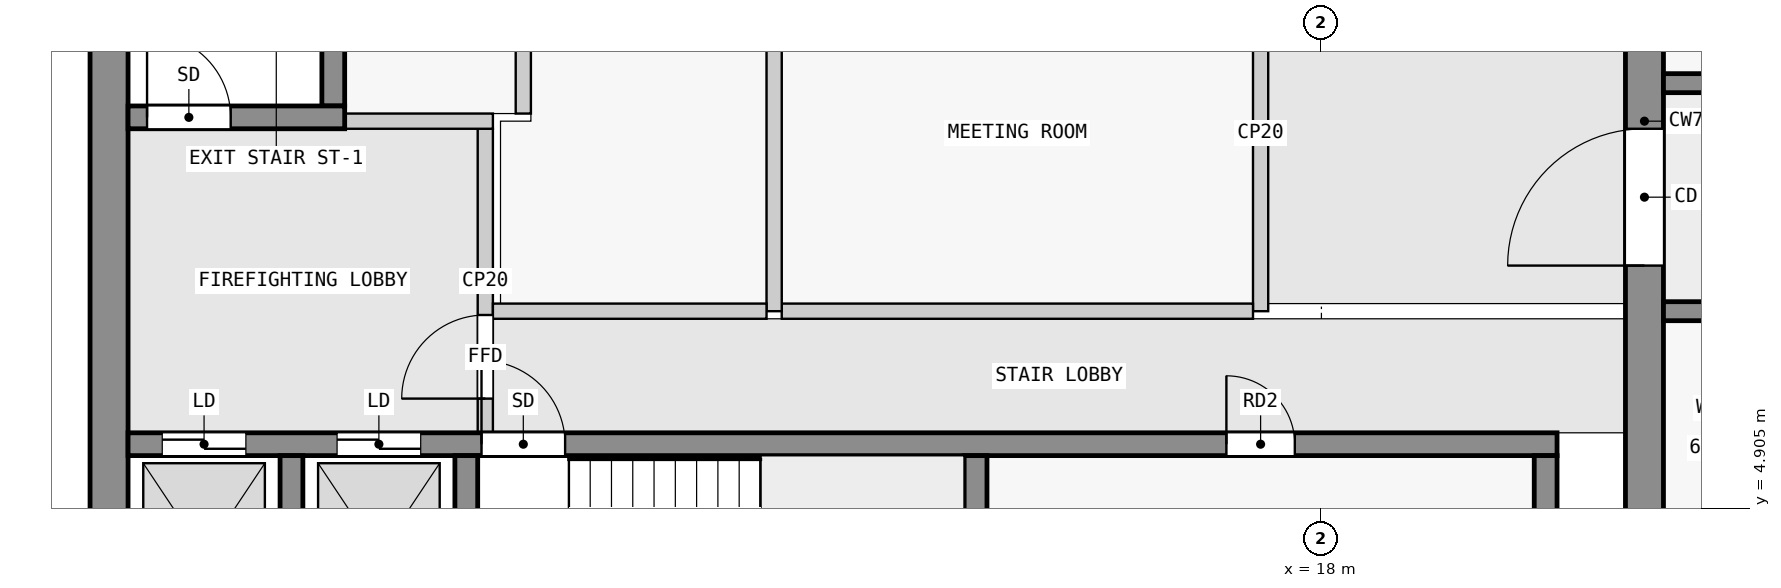
"""IFC4 building model, lengths in metres.
Left out: names, types, materials, properties, quantities, classifications, styles, units other than length and angle.
Written with IfcOpenShell. Run it as: python <this file> out.ifc"""

import sys

from ifc_helpers import new_model, si_unit, direction, frame, frame_2d, origin, place, context, subcontext, project, spatial, rectangle, extrude, element, fill, save


model = new_model("IFC4")
c1 = context("Model", 3, precision=1e-05, world=origin(), true_north=direction((0.0, 1.0)))
c2 = subcontext(c1, "Body", "Model", "MODEL_VIEW")
j1 = project(units=[si_unit("LENGTHUNIT", "METRE"), si_unit("PLANEANGLEUNIT", "RADIAN")], contexts=[c1])
p1 = place(None, origin())
s1 = spatial("IfcSite", under=j1, at=p1, CompositionType="ELEMENT")
p2 = place(p1, origin())
s2 = spatial("IfcBuilding", under=s1, at=p2, CompositionType="ELEMENT")
p3 = place(p2, frame((0.0, 0.0, 252.9)))
s3 = spatial("IfcBuildingStorey", under=s2, at=p3, CompositionType="ELEMENT", Elevation=252.9)
p4 = place(p3, frame((2.05, 2.5, 0.0), z_axis=(0.0, 0.0, 1.0), x_axis=(0.0, 1.0, 0.0)))
e1 = element("IfcWall", 1, at=p4, inside=s3, PredefinedType="SHEAR", context=c2, shape_type="SweptSolid", body=[
    extrude(rectangle(XDim=15.0, YDim=0.5, at=frame_2d((7.5, 0.0))), origin(), (0.0, 0.0, 1.0), 3.25),
])
p5 = place(p3, frame((22.25, 2.5, 0.0), z_axis=(0.0, 0.0, 1.0), x_axis=(0.0, 1.0, 0.0)))
e2 = element("IfcWall", 2, at=p5, inside=s3, PredefinedType="SHEAR", context=c2, shape_type="SweptSolid", body=[
    extrude(rectangle(XDim=15.0, YDim=0.5, at=frame_2d((7.5, 0.0))), origin(), (0.0, 0.0, 1.0), 3.25),
])
p6 = place(p5, frame((5.6, 0.0, 0.0)))
e3 = element("IfcOpeningElement", 3, at=p6, cuts=e2, PredefinedType="OPENING", context=c2, shape_type="SweptSolid", body=[
    extrude(rectangle(XDim=1.8, YDim=2.1, at=frame_2d((0.9, 1.05))), frame((0.0, 0.26, 0.0), z_axis=(0.0, -1.0, 0.0), x_axis=(1.0, 0.0, 0.0)), (0.0, 0.0, 1.0), 0.52),
])
for number, where, z_axis, x_axis in (
    (4, (4.45, 2.8, 0.0), (0.0, 0.0, 1.0), (0.0, 1.0, 0.0)),
    (5, (6.75, 2.8, 0.0), (0.0, 0.0, 1.0), (0.0, 1.0, 0.0)),
    (6, (13.45, 2.8, 0.0), (0.0, 0.0, 1.0), (0.0, 1.0, 0.0)),
    (7, (20.95, 2.8, 0.0), (0.0, 0.0, 1.0), (0.0, 1.0, 0.0)),
):
    element("IfcWall", number, at=place(p3, frame(where, z_axis=z_axis, x_axis=x_axis)), inside=s3, PredefinedType="SHEAR", context=c2, shape_type="SweptSolid", body=[
        extrude(rectangle(XDim=2.8, YDim=0.3, at=frame_2d((1.4, 0.0))), origin(), (0.0, 0.0, 1.0), 3.25),
    ])
p7 = place(p3, frame((2.3, 5.75, 0.0), z_axis=(0.0, 0.0, 1.0), x_axis=(1.0, 0.0, 0.0)))
e8 = element("IfcWall", 8, at=p7, inside=s3, PredefinedType="SHEAR", context=c2, shape_type="SweptSolid", body=[
    extrude(rectangle(XDim=18.8, YDim=0.3, at=frame_2d((9.4, 0.0))), origin(), (0.0, 0.0, 1.0), 3.25),
])
p8 = place(p7, frame((4.65, 0.0, 0.0)))
e9 = element("IfcOpeningElement", 9, at=p8, cuts=e8, PredefinedType="OPENING", context=c2, shape_type="SweptSolid", body=[
    extrude(rectangle(XDim=1.1, YDim=2.1, at=frame_2d((0.55, 1.05))), frame((0.0, 0.16, 0.0), z_axis=(0.0, -1.0, 0.0), x_axis=(1.0, 0.0, 0.0)), (0.0, 0.0, 1.0), 0.32),
])
p9 = place(p7, frame((0.45, 0.0, 0.0)))
e10 = element("IfcOpeningElement", 10, at=p9, cuts=e8, PredefinedType="OPENING", context=c2, shape_type="SweptSolid", body=[
    extrude(rectangle(XDim=1.1, YDim=2.1, at=frame_2d((0.55, 1.05))), frame((0.0, 0.16, 0.0), z_axis=(0.0, -1.0, 0.0), x_axis=(1.0, 0.0, 0.0)), (0.0, 0.0, 1.0), 0.32),
])
p10 = place(p7, frame((2.75, 0.0, 0.0)))
e11 = element("IfcOpeningElement", 11, at=p10, cuts=e8, PredefinedType="OPENING", context=c2, shape_type="SweptSolid", body=[
    extrude(rectangle(XDim=1.1, YDim=2.1, at=frame_2d((0.55, 1.05))), frame((0.0, 0.16, 0.0), z_axis=(0.0, -1.0, 0.0), x_axis=(1.0, 0.0, 0.0)), (0.0, 0.0, 1.0), 0.32),
])
p11 = place(p7, frame((14.45, 0.0, 0.0)))
e12 = element("IfcOpeningElement", 12, at=p11, cuts=e8, PredefinedType="OPENING", context=c2, shape_type="SweptSolid", body=[
    extrude(rectangle(XDim=0.9, YDim=2.1, at=frame_2d((0.45, 1.05))), frame((0.0, 0.16, 0.0), z_axis=(0.0, -1.0, 0.0), x_axis=(1.0, 0.0, 0.0)), (0.0, 0.0, 1.0), 0.32),
])
p12 = place(p3, frame((2.3, 10.05, 0.0), z_axis=(0.0, 0.0, 1.0), x_axis=(1.0, 0.0, 0.0)))
e13 = element("IfcWall", 13, at=p12, inside=s3, PredefinedType="SHEAR", context=c2, shape_type="SweptSolid", body=[
    extrude(rectangle(XDim=2.85, YDim=0.3, at=frame_2d((1.425, 0.0))), origin(), (0.0, 0.0, 1.0), 3.25),
])
p13 = place(p12, frame((0.25, 0.0, 0.0)))
e14 = element("IfcOpeningElement", 14, at=p13, cuts=e13, PredefinedType="OPENING", context=c2, shape_type="SweptSolid", body=[
    extrude(rectangle(XDim=1.1, YDim=2.1, at=frame_2d((0.55, 1.05))), frame((0.0, 0.16, 0.0), z_axis=(0.0, -1.0, 0.0), x_axis=(1.0, 0.0, 0.0)), (0.0, 0.0, 1.0), 0.32),
])
p14 = place(p3, frame((5.0, 10.2, 0.0), z_axis=(0.0, 0.0, 1.0), x_axis=(0.0, 1.0, 0.0)))
e15 = element("IfcWall", 15, at=p14, inside=s3, PredefinedType="SHEAR", context=c2, shape_type="SweptSolid", body=[
    extrude(rectangle(XDim=6.4, YDim=0.3, at=frame_2d((3.2, 0.0))), origin(), (0.0, 0.0, 1.0), 3.25),
])
p15 = place(p3, frame((22.5, 7.5, 0.0), z_axis=(0.0, 0.0, 1.0), x_axis=(1.0, 0.0, 0.0)))
e16 = element("IfcWall", 16, at=p15, inside=s3, PredefinedType="SHEAR", context=c2, shape_type="SweptSolid", body=[
    extrude(rectangle(XDim=22.5, YDim=0.25, at=frame_2d((11.25, 0.0))), origin(), (0.0, 0.0, 1.0), 3.25),
])
p16 = place(p15, frame((1.75, 0.0, 0.0)))
e17 = element("IfcOpeningElement", 17, at=p16, cuts=e16, PredefinedType="OPENING", context=c2, shape_type="SweptSolid", body=[
    extrude(rectangle(XDim=1.0, YDim=2.1, at=frame_2d((0.5, 1.05))), frame((0.0, 0.135, 0.0), z_axis=(0.0, -1.0, 0.0), x_axis=(1.0, 0.0, 0.0)), (0.0, 0.0, 1.0), 0.27),
])
p17 = place(p15, frame((5.85, 0.0, 0.0)))
e18 = element("IfcOpeningElement", 18, at=p17, cuts=e16, PredefinedType="OPENING", context=c2, shape_type="SweptSolid", body=[
    extrude(rectangle(XDim=1.8, YDim=2.1, at=frame_2d((0.9, 1.05))), frame((0.0, 0.135, 0.0), z_axis=(0.0, -1.0, 0.0), x_axis=(1.0, 0.0, 0.0)), (0.0, 0.0, 1.0), 0.27),
])
p18 = place(p15, frame((10.75, 0.0, 0.0)))
e19 = element("IfcOpeningElement", 19, at=p18, cuts=e16, PredefinedType="OPENING", context=c2, shape_type="SweptSolid", body=[
    extrude(rectangle(XDim=1.0, YDim=2.1, at=frame_2d((0.5, 1.05))), frame((0.0, 0.135, 0.0), z_axis=(0.0, -1.0, 0.0), x_axis=(1.0, 0.0, 0.0)), (0.0, 0.0, 1.0), 0.27),
])
p19 = place(p15, frame((15.25, 0.0, 0.0)))
e20 = element("IfcOpeningElement", 20, at=p19, cuts=e16, PredefinedType="OPENING", context=c2, shape_type="SweptSolid", body=[
    extrude(rectangle(XDim=1.0, YDim=2.1, at=frame_2d((0.5, 1.05))), frame((0.0, 0.135, 0.0), z_axis=(0.0, -1.0, 0.0), x_axis=(1.0, 0.0, 0.0)), (0.0, 0.0, 1.0), 0.27),
])
p20 = place(p15, frame((18.75, 0.0, 0.0)))
e21 = element("IfcOpeningElement", 21, at=p20, cuts=e16, PredefinedType="OPENING", context=c2, shape_type="SweptSolid", body=[
    extrude(rectangle(XDim=0.9, YDim=2.1, at=frame_2d((0.45, 1.05))), frame((0.0, 0.135, 0.0), z_axis=(0.0, -1.0, 0.0), x_axis=(1.0, 0.0, 0.0)), (0.0, 0.0, 1.0), 0.27),
])
p21 = place(p15, frame((20.95, 0.0, 0.0)))
e22 = element("IfcOpeningElement", 22, at=p21, cuts=e16, PredefinedType="OPENING", context=c2, shape_type="SweptSolid", body=[
    extrude(rectangle(XDim=1.0, YDim=2.1, at=frame_2d((0.5, 1.05))), frame((0.0, 0.135, 0.0), z_axis=(0.0, -1.0, 0.0), x_axis=(1.0, 0.0, 0.0)), (0.0, 0.0, 1.0), 0.27),
])
p22 = place(p3, frame((22.5, 10.5, 0.0), z_axis=(0.0, 0.0, 1.0), x_axis=(1.0, 0.0, 0.0)))
e23 = element("IfcWall", 23, at=p22, inside=s3, PredefinedType="SHEAR", context=c2, shape_type="SweptSolid", body=[
    extrude(rectangle(XDim=22.5, YDim=0.25, at=frame_2d((11.25, 0.0))), origin(), (0.0, 0.0, 1.0), 3.25),
])
p23 = place(p22, frame((1.75, 0.0, 0.0)))
e24 = element("IfcOpeningElement", 24, at=p23, cuts=e23, PredefinedType="OPENING", context=c2, shape_type="SweptSolid", body=[
    extrude(rectangle(XDim=1.0, YDim=2.1, at=frame_2d((0.5, 1.05))), frame((0.0, 0.135, 0.0), z_axis=(0.0, -1.0, 0.0), x_axis=(1.0, 0.0, 0.0)), (0.0, 0.0, 1.0), 0.27),
])
p24 = place(p22, frame((6.25, 0.0, 0.0)))
e25 = element("IfcOpeningElement", 25, at=p24, cuts=e23, PredefinedType="OPENING", context=c2, shape_type="SweptSolid", body=[
    extrude(rectangle(XDim=1.0, YDim=2.1, at=frame_2d((0.5, 1.05))), frame((0.0, 0.135, 0.0), z_axis=(0.0, -1.0, 0.0), x_axis=(1.0, 0.0, 0.0)), (0.0, 0.0, 1.0), 0.27),
])
p25 = place(p22, frame((10.75, 0.0, 0.0)))
e26 = element("IfcOpeningElement", 26, at=p25, cuts=e23, PredefinedType="OPENING", context=c2, shape_type="SweptSolid", body=[
    extrude(rectangle(XDim=1.0, YDim=2.1, at=frame_2d((0.5, 1.05))), frame((0.0, 0.135, 0.0), z_axis=(0.0, -1.0, 0.0), x_axis=(1.0, 0.0, 0.0)), (0.0, 0.0, 1.0), 0.27),
])
p26 = place(p22, frame((16.85, 0.0, 0.0)))
e27 = element("IfcOpeningElement", 27, at=p26, cuts=e23, PredefinedType="OPENING", context=c2, shape_type="SweptSolid", body=[
    extrude(rectangle(XDim=1.0, YDim=2.1, at=frame_2d((0.5, 1.05))), frame((0.0, 0.135, 0.0), z_axis=(0.0, -1.0, 0.0), x_axis=(1.0, 0.0, 0.0)), (0.0, 0.0, 1.0), 0.27),
])
p27 = place(p3, frame((7.0, 5.9, 0.0), z_axis=(0.0, 0.0, 1.0), x_axis=(0.0, 1.0, 0.0)))
e28 = element("IfcWall", 28, at=p27, inside=s3, PredefinedType="PARTITIONING", context=c2, shape_type="SweptSolid", body=[
    extrude(rectangle(XDim=4.0, YDim=0.2, at=frame_2d((2.0, 0.0))), origin(), (0.0, 0.0, 1.0), 3.25),
])
p28 = place(p27, frame((0.45, 0.0, 0.0)))
e29 = element("IfcOpeningElement", 29, at=p28, cuts=e28, PredefinedType="OPENING", context=c2, shape_type="SweptSolid", body=[
    extrude(rectangle(XDim=1.1, YDim=2.1, at=frame_2d((0.55, 1.05))), frame((0.0, 0.11, 0.0), z_axis=(0.0, -1.0, 0.0), x_axis=(1.0, 0.0, 0.0)), (0.0, 0.0, 1.0), 0.22),
])
p29 = place(p3, frame((5.15, 10.0, 0.0), z_axis=(0.0, 0.0, 1.0), x_axis=(1.0, 0.0, 0.0)))
e30 = element("IfcWall", 30, at=p29, inside=s3, PredefinedType="PARTITIONING", context=c2, shape_type="SweptSolid", body=[
    extrude(rectangle(XDim=1.95, YDim=0.2, at=frame_2d((0.975, 0.0))), origin(), (0.0, 0.0, 1.0), 3.25),
])
p30 = place(p3, frame((7.1, 7.5, 0.0), z_axis=(0.0, 0.0, 1.0), x_axis=(1.0, 0.0, 0.0)))
e31 = element("IfcWall", 31, at=p30, inside=s3, PredefinedType="PARTITIONING", context=c2, shape_type="SweptSolid", body=[
    extrude(rectangle(XDim=3.6, YDim=0.2, at=frame_2d((1.8, 0.0))), origin(), (0.0, 0.0, 1.0), 3.25),
])
p31 = place(p3, frame((10.8, 7.5, 0.0), z_axis=(0.0, 0.0, 1.0), x_axis=(0.0, 1.0, 0.0)))
e32 = element("IfcWall", 32, at=p31, inside=s3, PredefinedType="PARTITIONING", context=c2, shape_type="SweptSolid", body=[
    extrude(rectangle(XDim=4.7, YDim=0.2, at=frame_2d((2.35, 0.0))), origin(), (0.0, 0.0, 1.0), 3.25),
])
p32 = place(p3, frame((10.9, 7.5, 0.0), z_axis=(0.0, 0.0, 1.0), x_axis=(1.0, 0.0, 0.0)))
e33 = element("IfcWall", 33, at=p32, inside=s3, PredefinedType="PARTITIONING", context=c2, shape_type="SweptSolid", body=[
    extrude(rectangle(XDim=6.2, YDim=0.2, at=frame_2d((3.1, 0.0))), origin(), (0.0, 0.0, 1.0), 3.25),
])
p33 = place(p3, frame((17.2, 7.5, 0.0), z_axis=(0.0, 0.0, 1.0), x_axis=(0.0, 1.0, 0.0)))
e34 = element("IfcWall", 34, at=p33, inside=s3, PredefinedType="PARTITIONING", context=c2, shape_type="SweptSolid", body=[
    extrude(rectangle(XDim=4.7, YDim=0.2, at=frame_2d((2.35, 0.0))), origin(), (0.0, 0.0, 1.0), 3.25),
])
p34 = place(p3, frame((7.5, 10.1, 0.0), z_axis=(0.0, 0.0, 1.0), x_axis=(0.0, 1.0, 0.0)))
e35 = element("IfcWall", 35, at=p34, inside=s3, PredefinedType="PARTITIONING", context=c2, shape_type="SweptSolid", body=[
    extrude(rectangle(XDim=7.4, YDim=0.2, at=frame_2d((3.7, 0.0))), origin(), (0.0, 0.0, 1.0), 3.25),
])
p35 = place(p34, frame((1.5, 0.0, 0.0)))
e36 = element("IfcOpeningElement", 36, at=p35, cuts=e35, PredefinedType="OPENING", context=c2, shape_type="SweptSolid", body=[
    extrude(rectangle(XDim=0.9, YDim=2.1, at=frame_2d((0.45, 1.05))), frame((0.0, 0.11, 0.0), z_axis=(0.0, -1.0, 0.0), x_axis=(1.0, 0.0, 0.0)), (0.0, 0.0, 1.0), 0.22),
])
p36 = place(p34, frame((5.2, 0.0, 0.0)))
e37 = element("IfcOpeningElement", 37, at=p36, cuts=e35, PredefinedType="OPENING", context=c2, shape_type="SweptSolid", body=[
    extrude(rectangle(XDim=0.9, YDim=2.1, at=frame_2d((0.45, 1.05))), frame((0.0, 0.11, 0.0), z_axis=(0.0, -1.0, 0.0), x_axis=(1.0, 0.0, 0.0)), (0.0, 0.0, 1.0), 0.22),
])
p37 = place(p28, origin())
e38 = element("IfcDoor", 38, at=p37, inside=s3, OperationType="SINGLE_SWING_LEFT", PredefinedType="DOOR", context=c2, shape_type="SweptSolid", body=[
    extrude(rectangle(XDim=1.1, YDim=2.1, at=frame_2d((0.55, 1.05))), frame((0.0, 0.025, 0.0), z_axis=(0.0, -1.0, 0.0), x_axis=(1.0, 0.0, 0.0)), (0.0, 0.0, 1.0), 0.05),
])
fill(e29, e38)
p38 = place(p13, origin())
e39 = element("IfcDoor", 39, at=p38, inside=s3, OperationType="SINGLE_SWING_RIGHT", PredefinedType="DOOR", context=c2, shape_type="SweptSolid", body=[
    extrude(rectangle(XDim=1.1, YDim=2.1, at=frame_2d((0.55, 1.05))), frame((0.0, 0.025, 0.0), z_axis=(0.0, -1.0, 0.0), x_axis=(1.0, 0.0, 0.0)), (0.0, 0.0, 1.0), 0.05),
])
fill(e14, e39)
p39 = place(p8, origin())
e40 = element("IfcDoor", 40, at=p39, inside=s3, OperationType="SINGLE_SWING_LEFT", PredefinedType="DOOR", context=c2, shape_type="SweptSolid", body=[
    extrude(rectangle(XDim=1.1, YDim=2.1, at=frame_2d((0.55, 1.05))), frame((0.0, 0.025, 0.0), z_axis=(0.0, -1.0, 0.0), x_axis=(1.0, 0.0, 0.0)), (0.0, 0.0, 1.0), 0.05),
])
fill(e9, e40)
p40 = place(p9, origin())
e41 = element("IfcDoor", 41, at=p40, inside=s3, OperationType="DOUBLE_DOOR_SLIDING", PredefinedType="DOOR", context=c2, shape_type="SweptSolid", body=[
    extrude(rectangle(XDim=1.1, YDim=2.1, at=frame_2d((0.55, 1.05))), frame((0.0, 0.025, 0.0), z_axis=(0.0, -1.0, 0.0), x_axis=(1.0, 0.0, 0.0)), (0.0, 0.0, 1.0), 0.05),
])
fill(e10, e41)
p41 = place(p10, origin())
e42 = element("IfcDoor", 42, at=p41, inside=s3, OperationType="DOUBLE_DOOR_SLIDING", PredefinedType="DOOR", context=c2, shape_type="SweptSolid", body=[
    extrude(rectangle(XDim=1.1, YDim=2.1, at=frame_2d((0.55, 1.05))), frame((0.0, 0.025, 0.0), z_axis=(0.0, -1.0, 0.0), x_axis=(1.0, 0.0, 0.0)), (0.0, 0.0, 1.0), 0.05),
])
fill(e11, e42)
p42 = place(p6, origin())
e43 = element("IfcDoor", 43, at=p42, inside=s3, OperationType="DOUBLE_DOOR_SINGLE_SWING", PredefinedType="DOOR", context=c2, shape_type="SweptSolid", body=[
    extrude(rectangle(XDim=1.8, YDim=2.1, at=frame_2d((0.9, 1.05))), frame((0.0, 0.025, 0.0), z_axis=(0.0, -1.0, 0.0), x_axis=(1.0, 0.0, 0.0)), (0.0, 0.0, 1.0), 0.05),
])
fill(e3, e43)
p43 = place(p11, origin())
e44 = element("IfcDoor", 44, at=p43, inside=s3, OperationType="SINGLE_SWING_LEFT", PredefinedType="DOOR", context=c2, shape_type="SweptSolid", body=[
    extrude(rectangle(XDim=0.9, YDim=2.1, at=frame_2d((0.45, 1.05))), frame((0.0, 0.025, 0.0), z_axis=(0.0, -1.0, 0.0), x_axis=(1.0, 0.0, 0.0)), (0.0, 0.0, 1.0), 0.05),
])
fill(e12, e44)
save(model, sys.argv[1])
